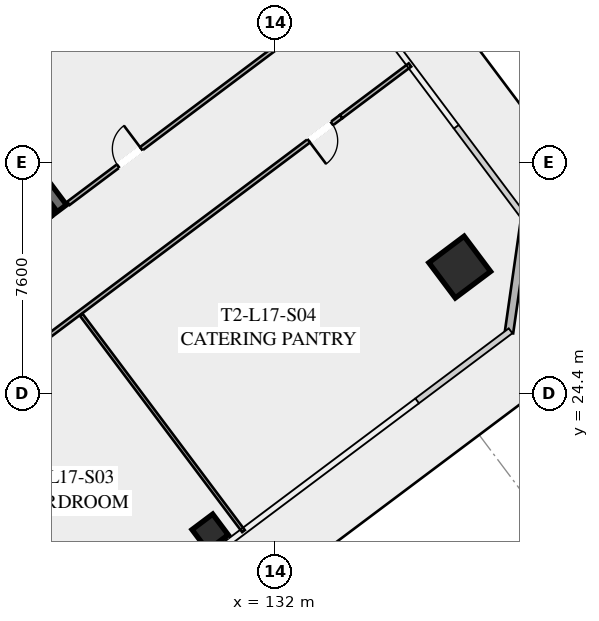
"""IFC4 building model, lengths in metres.
Left out: names, types, materials, properties, quantities, classifications, styles, units other than length and angle.
Written with IfcOpenShell. Run it as: python <this file> out.ifc"""

import sys

from ifc_helpers import new_model, si_unit, direction, frame, frame_2d, origin, origin_2d, place, context, subcontext, project, spatial, rectangle, hollow_rectangle, extrude, element, fill, save


model = new_model("IFC4")
c1 = context("Model", 3, precision=1e-05, world=origin(), true_north=direction((0.0, 1.0)))
c2 = subcontext(c1, "Body", "Model", "MODEL_VIEW")
j1 = project(units=[si_unit("LENGTHUNIT", "METRE"), si_unit("PLANEANGLEUNIT", "RADIAN")], contexts=[c1])
p1 = place(None, origin())
s1 = spatial("IfcSite", under=j1, at=p1, CompositionType="ELEMENT")
p2 = place(p1, origin())
s2 = spatial("IfcBuilding", under=s1, at=p2, CompositionType="ELEMENT")
p3 = place(p2, frame((0.0, 0.0, 67.2)))
s3 = spatial("IfcBuildingStorey", under=s2, at=p3, CompositionType="ELEMENT", Elevation=67.2)
p4 = place(p3, frame((115.524, 42.893, 0.0), z_axis=(0.0, 0.0, 1.0), x_axis=(0.600005007985, -0.799996243986, 0.0)))
e1 = element("IfcWall", 1, at=p4, inside=s3, PredefinedType="SHEAR", context=c2, shape_type="SweptSolid", body=[
    extrude(rectangle(XDim=15.6, YDim=0.65, at=frame_2d((7.8, 0.0))), origin(), (0.0, 0.0, 1.0), 3.55),
])
p5 = place(p3, frame((123.87, 30.59, 0.0), z_axis=(0.0, 0.0, 1.0), x_axis=(0.799999996291, 0.600000004945, 0.0)))
e2 = element("IfcColumn", 2, at=p5, inside=s3, PredefinedType="COLUMN", context=c2, shape_type="SweptSolid", body=[
    extrude(hollow_rectangle(XDim=1.3, YDim=1.3, WallThickness=0.05, at=origin_2d()), origin(), (0.0, 0.0, 1.0), 3.35),
])
p6 = place(p3, frame((138.08, 28.56, -0.195), z_axis=(0.0, 0.0, 1.0), x_axis=(0.799999996291, 0.600000004945, 0.0)))
e3 = element("IfcColumn", 3, at=p6, inside=s3, PredefinedType="COLUMN", context=c2, shape_type="SweptSolid", body=[
    extrude(hollow_rectangle(XDim=1.45, YDim=1.45, WallThickness=0.055, at=origin_2d()), origin(), (0.0, 0.0, 1.0), 3.545),
])
p7 = place(p3, frame((129.87, 19.84, -0.195), z_axis=(0.0, 0.0, 1.0), x_axis=(0.799999996291, 0.600000004945, 0.0)))
e4 = element("IfcColumn", 4, at=p7, inside=s3, PredefinedType="COLUMN", context=c2, shape_type="SweptSolid", body=[
    extrude(hollow_rectangle(XDim=0.85, YDim=0.85, WallThickness=0.035, at=origin_2d()), origin(), (0.0, 0.0, 1.0), 3.545),
])
p8 = place(p3, frame((140.24, 30.18, 0.0), z_axis=(0.0, 0.0, 1.0), x_axis=(-0.141430307517, -0.989948214866, 0.0)))
e5 = element("IfcWall", 5, at=p8, inside=s3, PredefinedType="SOLIDWALL", context=c2, shape_type="SweptSolid", body=[
    extrude(rectangle(XDim=3.818, YDim=0.28, at=frame_2d((1.909, 0.0))), origin(), (0.0, 0.0, 1.0), 3.35),
])
p9 = place(p3, frame((122.444, 34.208, 0.0), z_axis=(0.0, 0.0, 1.0), x_axis=(0.79999138319, 0.600011488909, 0.0)))
e6 = element("IfcWall", 6, at=p9, inside=s3, PredefinedType="SHEAR", context=c2, shape_type="SweptSolid", body=[
    extrude(rectangle(XDim=3.4, YDim=0.2, at=frame_2d((1.7, 0.0))), origin(), (0.0, 0.0, 1.0), 3.35),
])
p10 = place(p3, frame((134.18, 33.51, 0.0), z_axis=(0.0, 0.0, 1.0), x_axis=(-0.8, -0.6, 0.0)))
e7 = element("IfcWall", 7, at=p10, inside=s3, PredefinedType="PARTITIONING", context=c2, shape_type="SweptSolid", body=[
    extrude(rectangle(XDim=28.23, YDim=0.135, at=frame_2d((14.115, 0.0))), origin(), (0.0, 0.0, 1.0), 2.703),
])
p11 = place(p10, frame((26.9, 0.0, 0.0)))
e8 = element("IfcOpeningElement", 8, at=p11, cuts=e7, PredefinedType="OPENING", context=c2, shape_type="SweptSolid", body=[
    extrude(rectangle(XDim=0.95, YDim=2.05, at=frame_2d((0.475, 1.025))), frame((0.0, 0.077, 0.0), z_axis=(0.0, -1.0, 0.0), x_axis=(1.0, 0.0, 0.0)), (0.0, 0.0, 1.0), 0.155),
])
p12 = place(p10, frame((20.399, 0.0, 0.0)))
e9 = element("IfcOpeningElement", 9, at=p12, cuts=e7, PredefinedType="OPENING", context=c2, shape_type="SweptSolid", body=[
    extrude(rectangle(XDim=0.95, YDim=2.05, at=frame_2d((0.475, 1.025))), frame((0.0, 0.077, 0.0), z_axis=(0.0, -1.0, 0.0), x_axis=(1.0, 0.0, 0.0)), (0.0, 0.0, 1.0), 0.155),
])
p13 = place(p10, frame((16.339, 0.0, 0.0)))
e10 = element("IfcOpeningElement", 10, at=p13, cuts=e7, PredefinedType="OPENING", context=c2, shape_type="SweptSolid", body=[
    extrude(rectangle(XDim=0.95, YDim=2.05, at=frame_2d((0.475, 1.025))), frame((0.0, 0.077, 0.0), z_axis=(0.0, -1.0, 0.0), x_axis=(1.0, 0.0, 0.0)), (0.0, 0.0, 1.0), 0.155),
])
p14 = place(p10, frame((0.38, 0.0, 0.0)))
e11 = element("IfcOpeningElement", 11, at=p14, cuts=e7, PredefinedType="OPENING", context=c2, shape_type="SweptSolid", body=[
    extrude(rectangle(XDim=0.95, YDim=2.05, at=frame_2d((0.475, 1.025))), frame((0.0, 0.077, 0.0), z_axis=(0.0, -1.0, 0.0), x_axis=(1.0, 0.0, 0.0)), (0.0, 0.0, 1.0), 0.155),
])
p15 = place(p3, frame((134.18, 33.51, 0.0), z_axis=(0.0, 0.0, 1.0), x_axis=(0.8000207031, 0.599972394874, 0.0)))
e12 = element("IfcWall", 12, at=p15, inside=s3, PredefinedType="PARTITIONING", context=c2, shape_type="SweptSolid", body=[
    extrude(rectangle(XDim=2.83, YDim=0.135, at=frame_2d((1.415, 0.0))), origin(), (0.0, 0.0, 1.0), 2.703),
])
p16 = place(p3, frame((124.808, 15.256, 0.0), z_axis=(0.0, 0.0, 1.0), x_axis=(-0.600013167126, 0.799990124486, 0.0)))
e13 = element("IfcWall", 13, at=p16, inside=s3, PredefinedType="PARTITIONING", context=c2, shape_type="SweptSolid", body=[
    extrude(rectangle(XDim=8.9, YDim=0.11, at=frame_2d((4.45, 0.0))), origin(), (0.0, 0.0, 1.0), 2.703),
])
p17 = place(p3, frame((130.968, 19.876, 0.0), z_axis=(0.0, 0.0, 1.0), x_axis=(-0.6, 0.8, 0.0)))
e14 = element("IfcWall", 14, at=p17, inside=s3, PredefinedType="PARTITIONING", context=c2, shape_type="SweptSolid", body=[
    extrude(rectangle(XDim=8.9, YDim=0.11, at=frame_2d((4.45, 0.0))), origin(), (0.0, 0.0, 1.0), 2.703),
])
p18 = place(p3, frame((125.208, 30.656, 0.0), z_axis=(0.0, 0.0, 1.0), x_axis=(0.8, 0.6, 0.0)))
e15 = element("IfcWall", 15, at=p18, inside=s3, PredefinedType="PARTITIONING", context=c2, shape_type="SweptSolid", body=[
    extrude(rectangle(XDim=11.72, YDim=0.135, at=frame_2d((5.86, 0.0))), origin(), (0.0, 0.0, 1.0), 2.703),
])
p19 = place(p18, frame((2.045, 0.0, 0.0)))
e16 = element("IfcOpeningElement", 16, at=p19, cuts=e15, PredefinedType="OPENING", context=c2, shape_type="SweptSolid", body=[
    extrude(rectangle(XDim=0.95, YDim=2.05, at=frame_2d((0.475, 1.025))), frame((0.0, 0.077, 0.0), z_axis=(0.0, -1.0, 0.0), x_axis=(1.0, 0.0, 0.0)), (0.0, 0.0, 1.0), 0.155),
])
p20 = place(p14, origin())
e17 = element("IfcDoor", 17, at=p20, inside=s3, OperationType="SINGLE_SWING_RIGHT", PredefinedType="DOOR", context=c2, shape_type="SweptSolid", body=[
    extrude(rectangle(XDim=0.95, YDim=2.05, at=frame_2d((0.475, 1.025))), frame((0.0, 0.025, 0.0), z_axis=(0.0, -1.0, 0.0), x_axis=(1.0, 0.0, 0.0)), (0.0, 0.0, 1.0), 0.05),
])
fill(e11, e17)
p21 = place(p19, origin())
e18 = element("IfcDoor", 18, at=p21, inside=s3, OperationType="SINGLE_SWING_RIGHT", PredefinedType="DOOR", context=c2, shape_type="SweptSolid", body=[
    extrude(rectangle(XDim=0.95, YDim=2.05, at=frame_2d((0.475, 1.025))), frame((0.0, 0.025, 0.0), z_axis=(0.0, -1.0, 0.0), x_axis=(1.0, 0.0, 0.0)), (0.0, 0.0, 1.0), 0.05),
])
fill(e16, e18)
save(model, sys.argv[1])
